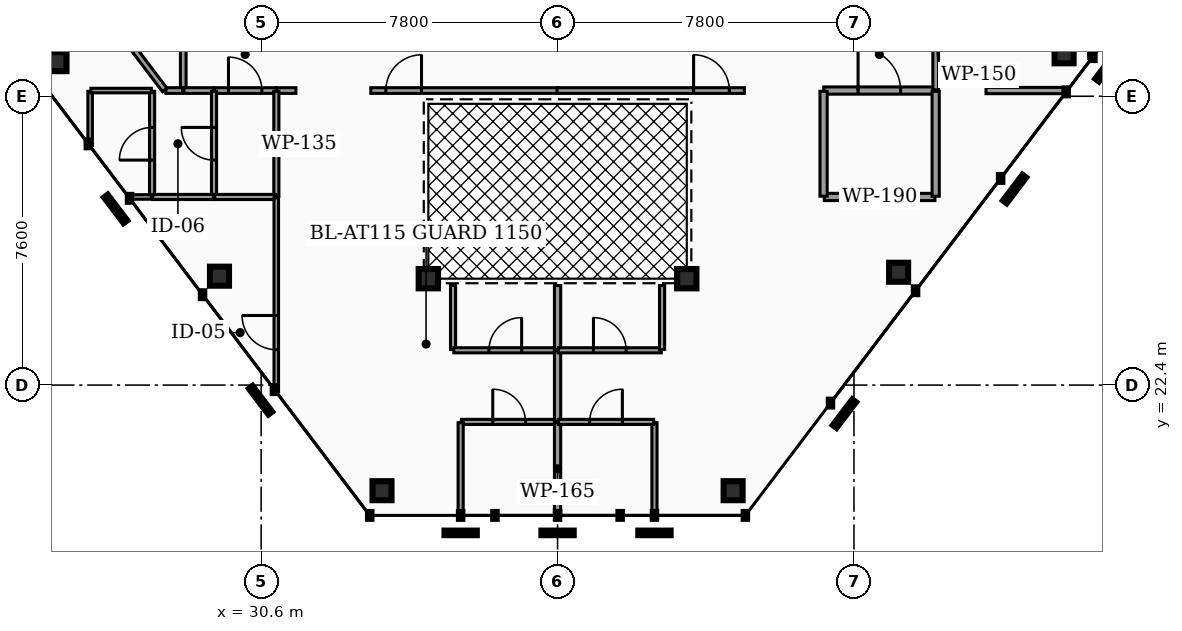
"""IFC4 building model, lengths in metres.
Left out: names, types, materials, properties, quantities, classifications, styles, units other than length and angle.
Written with IfcOpenShell. Run it as: python <this file> out.ifc"""

import sys

from ifc_helpers import new_model, si_unit, direction, frame, frame_2d, origin, origin_2d, place, context, subcontext, project, spatial, rectangle, hollow_rectangle, hollow_circle, extrude, element, fill, save


model = new_model("IFC4")
c1 = context("Model", 3, precision=1e-05, world=origin(), true_north=direction((0.0, 1.0)))
c2 = subcontext(c1, "Body", "Model", "MODEL_VIEW")
j1 = project(units=[si_unit("LENGTHUNIT", "METRE"), si_unit("PLANEANGLEUNIT", "RADIAN")], contexts=[c1])
p1 = place(None, origin())
s1 = spatial("IfcSite", under=j1, at=p1, CompositionType="ELEMENT")
p2 = place(p1, origin())
s2 = spatial("IfcBuilding", under=s1, at=p2, CompositionType="ELEMENT")
p3 = place(p2, frame((0.0, 0.0, 258.4)))
s3 = spatial("IfcBuildingStorey", under=s2, at=p3, CompositionType="ELEMENT", Elevation=258.4)
for number, where, z_axis, x_axis in (
    (1, (25.228, 30.91, 0.0), (0.0, 0.0, 1.0), (1.0, 0.0, 0.0)),
    (2, (29.504, 25.266, 0.0), (0.0, 0.0, 1.0), (1.0, 0.0, 0.0)),
    (3, (33.78, 19.621, 0.0), (0.0, 0.0, 1.0), (1.0, 0.0, 0.0)),
    (4, (43.02, 19.621, 0.0), (0.0, 0.0, 1.0), (1.0, 0.0, 0.0)),
    (5, (47.375, 25.369, 0.0), (0.0, 0.0, 1.0), (1.0, 0.0, 0.0)),
    (6, (51.729, 31.117, 0.0), (0.0, 0.0, 1.0), (1.0, 0.0, 0.0)),
):
    element("IfcColumn", number, at=place(p3, frame(where, z_axis=z_axis, x_axis=x_axis)), inside=s3, PredefinedType="COLUMN", context=c2, shape_type="SweptSolid", body=[
        extrude(hollow_rectangle(XDim=0.5, YDim=0.5, WallThickness=0.025, at=origin_2d()), origin(), (0.0, 0.0, 1.0), 3.18),
    ])
for number, where, z_axis, x_axis in (
    (7, (35.0, 25.2, 0.0), (0.0, 0.0, 1.0), (1.0, 0.0, 0.0)),
    (8, (41.8, 25.2, 0.0), (0.0, 0.0, 1.0), (1.0, 0.0, 0.0)),
):
    element("IfcColumn", number, at=place(p3, frame(where, z_axis=z_axis, x_axis=x_axis)), inside=s3, PredefinedType="COLUMN", context=c2, shape_type="SweptSolid", body=[
        extrude(hollow_circle(Radius=0.254, WallThickness=0.02, at=origin_2d()), origin(), (0.0, 0.0, 1.0), 3.18),
    ])
p4 = place(p3, frame((45.405, 30.15, 0.0), z_axis=(0.0, 0.0, 1.0), x_axis=(1.0, 0.0, 0.0)))
e9 = element("IfcWall", 9, at=p4, inside=s3, PredefinedType="PARTITIONING", context=c2, shape_type="SweptSolid", body=[
    extrude(rectangle(XDim=2.925, YDim=0.19, at=frame_2d((1.462, 0.0))), origin(), (0.0, 0.0, 1.0), 2.235),
])
p5 = place(p4, frame((0.903, 0.0, 0.0)))
e10 = element("IfcOpeningElement", 10, at=p5, cuts=e9, PredefinedType="OPENING", context=c2, shape_type="SweptSolid", body=[
    extrude(rectangle(XDim=1.12, YDim=2.05, at=frame_2d((0.56, 1.025))), frame((0.0, 0.105, 0.0), z_axis=(0.0, -1.0, 0.0), x_axis=(1.0, 0.0, 0.0)), (0.0, 0.0, 1.0), 0.21),
])
p6 = place(p3, frame((28.55, 30.17, 0.0), z_axis=(0.0, 0.0, 1.0), x_axis=(0.0, 1.0, 0.0)))
e11 = element("IfcWall", 11, at=p6, inside=s3, PredefinedType="PARTITIONING", context=c2, shape_type="SweptSolid", body=[
    extrude(rectangle(XDim=3.06, YDim=0.15, at=frame_2d((1.53, 0.0))), origin(), (0.0, 0.0, 1.0), 2.235),
])
p7 = place(p6, frame((1.06, 0.0, 0.0)))
e12 = element("IfcOpeningElement", 12, at=p7, cuts=e11, PredefinedType="OPENING", context=c2, shape_type="SweptSolid", body=[
    extrude(rectangle(XDim=0.94, YDim=2.05, at=frame_2d((0.47, 1.025))), frame((0.0, 0.085, 0.0), z_axis=(0.0, -1.0, 0.0), x_axis=(1.0, 0.0, 0.0)), (0.0, 0.0, 1.0), 0.17),
])
p8 = place(p3, frame((48.35, 30.17, 0.0), z_axis=(0.0, 0.0, 1.0), x_axis=(0.0, 1.0, 0.0)))
e13 = element("IfcWall", 13, at=p8, inside=s3, PredefinedType="PARTITIONING", context=c2, shape_type="SweptSolid", body=[
    extrude(rectangle(XDim=3.06, YDim=0.15, at=frame_2d((1.53, 0.0))), origin(), (0.0, 0.0, 1.0), 2.235),
])
p9 = place(p3, frame((28.57, 30.15, 0.0), z_axis=(0.0, 0.0, 1.0), x_axis=(1.0, 0.0, 0.0)))
e14 = element("IfcWall", 14, at=p9, inside=s3, PredefinedType="PARTITIONING", context=c2, shape_type="SweptSolid", body=[
    extrude(rectangle(XDim=0.785, YDim=0.15, at=frame_2d((0.393, 0.0))), origin(), (0.0, 0.0, 1.0), 2.235),
])
p10 = place(p3, frame((29.365, 30.15, 0.0), z_axis=(0.0, 0.0, 1.0), x_axis=(1.0, 0.0, 0.0)))
e15 = element("IfcWall", 15, at=p10, inside=s3, PredefinedType="PARTITIONING", context=c2, shape_type="SweptSolid", body=[
    extrude(rectangle(XDim=1.63, YDim=0.15, at=frame_2d((0.815, 0.0))), origin(), (0.0, 0.0, 1.0), 2.235),
])
p11 = place(p10, frame((0.375, 0.0, 0.0)))
e16 = element("IfcOpeningElement", 16, at=p11, cuts=e15, PredefinedType="OPENING", context=c2, shape_type="SweptSolid", body=[
    extrude(rectangle(XDim=0.88, YDim=2.05, at=frame_2d((0.44, 1.025))), frame((0.0, 0.085, 0.0), z_axis=(0.0, -1.0, 0.0), x_axis=(1.0, 0.0, 0.0)), (0.0, 0.0, 1.0), 0.17),
])
p12 = place(p3, frame((33.485, 30.15, 0.0), z_axis=(0.0, 0.0, 1.0), x_axis=(1.0, 0.0, 0.0)))
e17 = element("IfcWall", 17, at=p12, inside=s3, PredefinedType="PARTITIONING", context=c2, shape_type="SweptSolid", body=[
    extrude(rectangle(XDim=4.93, YDim=0.15, at=frame_2d((2.465, 0.0))), origin(), (0.0, 0.0, 1.0), 2.235),
])
p13 = place(p12, frame((0.395, 0.0, 0.0)))
e18 = element("IfcOpeningElement", 18, at=p13, cuts=e17, PredefinedType="OPENING", context=c2, shape_type="SweptSolid", body=[
    extrude(rectangle(XDim=0.94, YDim=2.05, at=frame_2d((0.47, 1.025))), frame((0.0, 0.085, 0.0), z_axis=(0.0, -1.0, 0.0), x_axis=(1.0, 0.0, 0.0)), (0.0, 0.0, 1.0), 0.17),
])
p14 = place(p3, frame((31.005, 30.15, 0.0), z_axis=(0.0, 0.0, 1.0), x_axis=(1.0, 0.0, 0.0)))
e19 = element("IfcWall", 19, at=p14, inside=s3, PredefinedType="PARTITIONING", context=c2, shape_type="SweptSolid", body=[
    extrude(rectangle(XDim=0.51, YDim=0.15, at=frame_2d((0.255, 0.0))), origin(), (0.0, 0.0, 1.0), 2.235),
])
p15 = place(p3, frame((38.385, 30.15, 0.0), z_axis=(0.0, 0.0, 1.0), x_axis=(1.0, 0.0, 0.0)))
e20 = element("IfcWall", 20, at=p15, inside=s3, PredefinedType="PARTITIONING", context=c2, shape_type="SweptSolid", body=[
    extrude(rectangle(XDim=4.93, YDim=0.15, at=frame_2d((2.465, 0.0))), origin(), (0.0, 0.0, 1.0), 2.235),
])
p16 = place(p15, frame((3.595, 0.0, 0.0)))
e21 = element("IfcOpeningElement", 21, at=p16, cuts=e20, PredefinedType="OPENING", context=c2, shape_type="SweptSolid", body=[
    extrude(rectangle(XDim=0.94, YDim=2.05, at=frame_2d((0.47, 1.025))), frame((0.0, 0.085, 0.0), z_axis=(0.0, -1.0, 0.0), x_axis=(1.0, 0.0, 0.0)), (0.0, 0.0, 1.0), 0.17),
])
p17 = place(p3, frame((45.42, 27.35, 0.0), z_axis=(0.0, 0.0, 1.0), x_axis=(1.0, 0.0, 0.0)))
e22 = element("IfcWall", 22, at=p17, inside=s3, PredefinedType="PARTITIONING", context=c2, shape_type="SweptSolid", body=[
    extrude(rectangle(XDim=2.91, YDim=0.19, at=frame_2d((1.455, 0.0))), origin(), (0.0, 0.0, 1.0), 2.235),
])
for number, where, z_axis, x_axis in (
    (23, (45.4, 27.37, 0.0), (0.0, 0.0, 1.0), (0.0, 1.0, 0.0)),
    (24, (48.35, 27.37, 0.0), (0.0, 0.0, 1.0), (0.0, 1.0, 0.0)),
):
    element("IfcWall", number, at=place(p3, frame(where, z_axis=z_axis, x_axis=x_axis)), inside=s3, PredefinedType="PARTITIONING", context=c2, shape_type="SweptSolid", body=[
        extrude(rectangle(XDim=2.76, YDim=0.19, at=frame_2d((1.38, 0.0))), origin(), (0.0, 0.0, 1.0), 2.235),
    ])
p18 = place(p3, frame((28.094, 30.15, 0.0), z_axis=(0.0, 0.0, 1.0), x_axis=(1.0, 0.0, 0.0)))
e25 = element("IfcWall", 25, at=p18, inside=s3, PredefinedType="PARTITIONING", context=c2, shape_type="SweptSolid", body=[
    extrude(rectangle(XDim=0.436, YDim=0.15, at=frame_2d((0.218, 0.0))), origin(), (0.0, 0.0, 1.0), 2.235),
])
p19 = place(p3, frame((26.562, 32.146, 0.0), z_axis=(0.0, 0.0, 1.0), x_axis=(0.603891739408, -0.797066350485, 0.0)))
e26 = element("IfcWall", 26, at=p19, inside=s3, PredefinedType="PARTITIONING", context=c2, shape_type="SweptSolid", body=[
    extrude(rectangle(XDim=2.485, YDim=0.15, at=frame_2d((1.242, 0.0))), origin(), (0.0, 0.0, 1.0), 2.235),
])
p20 = place(p3, frame((29.36, 27.37, 0.0), z_axis=(0.0, 0.0, 1.0), x_axis=(0.0, 1.0, 0.0)))
e27 = element("IfcWall", 27, at=p20, inside=s3, PredefinedType="PARTITIONING", context=c2, shape_type="SweptSolid", body=[
    extrude(rectangle(XDim=2.76, YDim=0.135, at=frame_2d((1.38, 0.0))), origin(), (0.0, 0.0, 1.0), 2.235),
])
p21 = place(p20, frame((0.95, 0.0, 0.0)))
e28 = element("IfcOpeningElement", 28, at=p21, cuts=e27, PredefinedType="OPENING", context=c2, shape_type="SweptSolid", body=[
    extrude(rectangle(XDim=0.86, YDim=2.05, at=frame_2d((0.43, 1.025))), frame((0.0, 0.077, 0.0), z_axis=(0.0, -1.0, 0.0), x_axis=(1.0, 0.0, 0.0)), (0.0, 0.0, 1.0), 0.155),
])
p22 = place(p3, frame((27.73, 27.37, 0.0), z_axis=(0.0, 0.0, 1.0), x_axis=(0.0, 1.0, 0.0)))
e29 = element("IfcWall", 29, at=p22, inside=s3, PredefinedType="PARTITIONING", context=c2, shape_type="SweptSolid", body=[
    extrude(rectangle(XDim=2.76, YDim=0.135, at=frame_2d((1.38, 0.0))), origin(), (0.0, 0.0, 1.0), 2.235),
])
p23 = place(p22, frame((0.95, 0.0, 0.0)))
e30 = element("IfcOpeningElement", 30, at=p23, cuts=e29, PredefinedType="OPENING", context=c2, shape_type="SweptSolid", body=[
    extrude(rectangle(XDim=0.86, YDim=2.05, at=frame_2d((0.43, 1.025))), frame((0.0, 0.077, 0.0), z_axis=(0.0, -1.0, 0.0), x_axis=(1.0, 0.0, 0.0)), (0.0, 0.0, 1.0), 0.155),
])
p24 = place(p3, frame((27.75, 27.35, 0.0), z_axis=(0.0, 0.0, 1.0), x_axis=(1.0, 0.0, 0.0)))
e31 = element("IfcWall", 31, at=p24, inside=s3, PredefinedType="PARTITIONING", context=c2, shape_type="SweptSolid", body=[
    extrude(rectangle(XDim=1.59, YDim=0.135, at=frame_2d((0.795, 0.0))), origin(), (0.0, 0.0, 1.0), 2.235),
])
p25 = place(p3, frame((31.0, 27.37, 0.0), z_axis=(0.0, 0.0, 1.0), x_axis=(0.0, 1.0, 0.0)))
e32 = element("IfcWall", 32, at=p25, inside=s3, PredefinedType="PARTITIONING", context=c2, shape_type="SweptSolid", body=[
    extrude(rectangle(XDim=2.76, YDim=0.135, at=frame_2d((1.38, 0.0))), origin(), (0.0, 0.0, 1.0), 2.235),
])
p26 = place(p3, frame((29.38, 27.35, 0.0), z_axis=(0.0, 0.0, 1.0), x_axis=(1.0, 0.0, 0.0)))
e33 = element("IfcWall", 33, at=p26, inside=s3, PredefinedType="PARTITIONING", context=c2, shape_type="SweptSolid", body=[
    extrude(rectangle(XDim=1.6, YDim=0.135, at=frame_2d((0.8, 0.0))), origin(), (0.0, 0.0, 1.0), 2.235),
])
p27 = place(p3, frame((27.125, 27.35, 0.0), z_axis=(0.0, 0.0, 1.0), x_axis=(1.0, 0.0, 0.0)))
e34 = element("IfcWall", 34, at=p27, inside=s3, PredefinedType="PARTITIONING", context=c2, shape_type="SweptSolid", body=[
    extrude(rectangle(XDim=0.585, YDim=0.12, at=frame_2d((0.293, 0.0))), origin(), (0.0, 0.0, 1.0), 2.235),
])
p28 = place(p3, frame((26.1, 28.698, 0.0), z_axis=(0.0, 0.0, 1.0), x_axis=(0.0, 1.0, 0.0)))
e35 = element("IfcWall", 35, at=p28, inside=s3, PredefinedType="PARTITIONING", context=c2, shape_type="SweptSolid", body=[
    extrude(rectangle(XDim=1.432, YDim=0.12, at=frame_2d((0.716, 0.0))), origin(), (0.0, 0.0, 1.0), 2.235),
])
p29 = place(p3, frame((26.12, 30.15, 0.0), z_axis=(0.0, 0.0, 1.0), x_axis=(1.0, 0.0, 0.0)))
e36 = element("IfcWall", 36, at=p29, inside=s3, PredefinedType="PARTITIONING", context=c2, shape_type="SweptSolid", body=[
    extrude(rectangle(XDim=1.59, YDim=0.12, at=frame_2d((0.795, 0.0))), origin(), (0.0, 0.0, 1.0), 2.235),
])
p30 = place(p3, frame((35.65, 23.336, 0.0), z_axis=(0.0, 0.0, 1.0), x_axis=(0.0, 1.0, 0.0)))
e37 = element("IfcWall", 37, at=p30, inside=s3, PredefinedType="PARTITIONING", context=c2, shape_type="SweptSolid", body=[
    extrude(rectangle(XDim=1.684, YDim=0.135, at=frame_2d((0.842, 0.0))), origin(), (0.0, 0.0, 1.0), 2.235),
])
p31 = place(p3, frame((35.67, 23.316, 0.0), z_axis=(0.0, 0.0, 1.0), x_axis=(1.0, 0.0, 0.0)))
e38 = element("IfcWall", 38, at=p31, inside=s3, PredefinedType="PARTITIONING", context=c2, shape_type="SweptSolid", body=[
    extrude(rectangle(XDim=2.71, YDim=0.135, at=frame_2d((1.355, 0.0))), origin(), (0.0, 0.0, 1.0), 2.235),
])
p32 = place(p31, frame((0.925, 0.0, 0.0)))
e39 = element("IfcOpeningElement", 39, at=p32, cuts=e38, PredefinedType="OPENING", context=c2, shape_type="SweptSolid", body=[
    extrude(rectangle(XDim=0.86, YDim=2.05, at=frame_2d((0.43, 1.025))), frame((0.0, 0.077, 0.0), z_axis=(0.0, -1.0, 0.0), x_axis=(1.0, 0.0, 0.0)), (0.0, 0.0, 1.0), 0.155),
])
p33 = place(p3, frame((35.87, 21.431, 0.0), z_axis=(0.0, 0.0, 1.0), x_axis=(1.0, 0.0, 0.0)))
e40 = element("IfcWall", 40, at=p33, inside=s3, PredefinedType="PARTITIONING", context=c2, shape_type="SweptSolid", body=[
    extrude(rectangle(XDim=2.51, YDim=0.135, at=frame_2d((1.255, 0.0))), origin(), (0.0, 0.0, 1.0), 2.235),
])
p34 = place(p33, frame((0.825, 0.0, 0.0)))
e41 = element("IfcOpeningElement", 41, at=p34, cuts=e40, PredefinedType="OPENING", context=c2, shape_type="SweptSolid", body=[
    extrude(rectangle(XDim=0.86, YDim=2.05, at=frame_2d((0.43, 1.025))), frame((0.0, 0.077, 0.0), z_axis=(0.0, -1.0, 0.0), x_axis=(1.0, 0.0, 0.0)), (0.0, 0.0, 1.0), 0.155),
])
p35 = place(p3, frame((35.85, 18.986, 0.0), z_axis=(0.0, 0.0, 1.0), x_axis=(0.0, 1.0, 0.0)))
e42 = element("IfcWall", 42, at=p35, inside=s3, PredefinedType="PARTITIONING", context=c2, shape_type="SweptSolid", body=[
    extrude(rectangle(XDim=2.425, YDim=0.135, at=frame_2d((1.212, 0.0))), origin(), (0.0, 0.0, 1.0), 2.235),
])
p36 = place(p3, frame((30.998, 22.232, 0.0), z_axis=(0.0, 0.0, 1.0), x_axis=(0.0, 1.0, 0.0)))
e43 = element("IfcWall", 43, at=p36, inside=s3, PredefinedType="PARTITIONING", context=c2, shape_type="SweptSolid", body=[
    extrude(rectangle(XDim=5.098, YDim=0.12, at=frame_2d((2.549, 0.0))), origin(), (0.0, 0.0, 1.0), 2.235),
])
p37 = place(p36, frame((1.099, 0.0, 0.0)))
e44 = element("IfcOpeningElement", 44, at=p37, cuts=e43, PredefinedType="OPENING", context=c2, shape_type="SweptSolid", body=[
    extrude(rectangle(XDim=0.9, YDim=2.05, at=frame_2d((0.45, 1.025))), frame((0.0, 0.07, 0.0), z_axis=(0.0, -1.0, 0.0), x_axis=(1.0, 0.0, 0.0)), (0.0, 0.0, 1.0), 0.14),
])
p38 = place(p3, frame((38.4, 21.451, 0.0), z_axis=(0.0, 0.0, 1.0), x_axis=(0.0, 1.0, 0.0)))
e45 = element("IfcWall", 45, at=p38, inside=s3, PredefinedType="PARTITIONING", context=c2, shape_type="SweptSolid", body=[
    extrude(rectangle(XDim=1.844, YDim=0.165, at=frame_2d((0.922, 0.0))), origin(), (0.0, 0.0, 1.0), 2.235),
])
p39 = place(p3, frame((38.4, 23.336, 0.0), z_axis=(0.0, 0.0, 1.0), x_axis=(0.0, 1.0, 0.0)))
e46 = element("IfcWall", 46, at=p39, inside=s3, PredefinedType="PARTITIONING", context=c2, shape_type="SweptSolid", body=[
    extrude(rectangle(XDim=1.684, YDim=0.165, at=frame_2d((0.842, 0.0))), origin(), (0.0, 0.0, 1.0), 2.235),
])
p40 = place(p3, frame((38.4, 18.986, 0.0), z_axis=(0.0, 0.0, 1.0), x_axis=(0.0, 1.0, 0.0)))
e47 = element("IfcWall", 47, at=p40, inside=s3, PredefinedType="PARTITIONING", context=c2, shape_type="SweptSolid", body=[
    extrude(rectangle(XDim=2.425, YDim=0.165, at=frame_2d((1.212, 0.0))), origin(), (0.0, 0.0, 1.0), 2.235),
])
p41 = place(p3, frame((38.42, 23.316, 0.0), z_axis=(0.0, 0.0, 1.0), x_axis=(1.0, 0.0, 0.0)))
e48 = element("IfcWall", 48, at=p41, inside=s3, PredefinedType="PARTITIONING", context=c2, shape_type="SweptSolid", body=[
    extrude(rectangle(XDim=2.71, YDim=0.135, at=frame_2d((1.355, 0.0))), origin(), (0.0, 0.0, 1.0), 2.235),
])
p42 = place(p41, frame((0.925, 0.0, 0.0)))
e49 = element("IfcOpeningElement", 49, at=p42, cuts=e48, PredefinedType="OPENING", context=c2, shape_type="SweptSolid", body=[
    extrude(rectangle(XDim=0.86, YDim=2.05, at=frame_2d((0.43, 1.025))), frame((0.0, 0.077, 0.0), z_axis=(0.0, -1.0, 0.0), x_axis=(1.0, 0.0, 0.0)), (0.0, 0.0, 1.0), 0.155),
])
p43 = place(p3, frame((41.15, 23.336, 0.0), z_axis=(0.0, 0.0, 1.0), x_axis=(0.0, 1.0, 0.0)))
e50 = element("IfcWall", 50, at=p43, inside=s3, PredefinedType="PARTITIONING", context=c2, shape_type="SweptSolid", body=[
    extrude(rectangle(XDim=1.684, YDim=0.135, at=frame_2d((0.842, 0.0))), origin(), (0.0, 0.0, 1.0), 2.235),
])
p44 = place(p3, frame((40.95, 18.986, 0.0), z_axis=(0.0, 0.0, 1.0), x_axis=(0.0, 1.0, 0.0)))
e51 = element("IfcWall", 51, at=p44, inside=s3, PredefinedType="PARTITIONING", context=c2, shape_type="SweptSolid", body=[
    extrude(rectangle(XDim=2.425, YDim=0.135, at=frame_2d((1.212, 0.0))), origin(), (0.0, 0.0, 1.0), 2.235),
])
p45 = place(p3, frame((38.42, 21.431, 0.0), z_axis=(0.0, 0.0, 1.0), x_axis=(1.0, 0.0, 0.0)))
e52 = element("IfcWall", 52, at=p45, inside=s3, PredefinedType="PARTITIONING", context=c2, shape_type="SweptSolid", body=[
    extrude(rectangle(XDim=2.51, YDim=0.135, at=frame_2d((1.255, 0.0))), origin(), (0.0, 0.0, 1.0), 2.235),
])
p46 = place(p45, frame((0.825, 0.0, 0.0)))
e53 = element("IfcOpeningElement", 53, at=p46, cuts=e52, PredefinedType="OPENING", context=c2, shape_type="SweptSolid", body=[
    extrude(rectangle(XDim=0.86, YDim=2.05, at=frame_2d((0.43, 1.025))), frame((0.0, 0.077, 0.0), z_axis=(0.0, -1.0, 0.0), x_axis=(1.0, 0.0, 0.0)), (0.0, 0.0, 1.0), 0.155),
])
p47 = place(p3, frame((49.674, 30.15, 0.0), z_axis=(0.0, 0.0, 1.0), x_axis=(1.0, 0.0, 0.0)))
e54 = element("IfcWall", 54, at=p47, inside=s3, PredefinedType="PARTITIONING", context=c2, shape_type="SweptSolid", body=[
    extrude(rectangle(XDim=2.122, YDim=0.165, at=frame_2d((1.061, 0.0))), origin(), (0.0, 0.0, 1.0), 2.235),
])
p48 = place(p3, frame((52.439, 30.994, 0.0), z_axis=(0.0, 0.0, 1.0), x_axis=(0.0, 1.0, 0.0)))
e55 = element("IfcWall", 55, at=p48, inside=s3, PredefinedType="PARTITIONING", context=c2, shape_type="SweptSolid", body=[
    extrude(rectangle(XDim=1.686, YDim=0.135, at=frame_2d((0.843, 0.0))), origin(), (0.0, 0.0, 1.0), 2.235),
])
p49 = place(p5, origin())
e56 = element("IfcDoor", 56, at=p49, inside=s3, OperationType="SINGLE_SWING_LEFT", PredefinedType="DOOR", context=c2, shape_type="SweptSolid", body=[
    extrude(rectangle(XDim=1.12, YDim=2.05, at=frame_2d((0.56, 1.025))), frame((0.0, 0.025, 0.0), z_axis=(0.0, -1.0, 0.0), x_axis=(1.0, 0.0, 0.0)), (0.0, 0.0, 1.0), 0.05),
])
fill(e10, e56)
p50 = place(p11, origin())
e57 = element("IfcDoor", 57, at=p50, inside=s3, OperationType="SINGLE_SWING_LEFT", PredefinedType="DOOR", context=c2, shape_type="SweptSolid", body=[
    extrude(rectangle(XDim=0.88, YDim=2.05, at=frame_2d((0.44, 1.025))), frame((0.0, 0.025, 0.0), z_axis=(0.0, -1.0, 0.0), x_axis=(1.0, 0.0, 0.0)), (0.0, 0.0, 1.0), 0.05),
])
fill(e16, e57)
p51 = place(p13, origin())
e58 = element("IfcDoor", 58, at=p51, inside=s3, OperationType="SINGLE_SWING_RIGHT", PredefinedType="DOOR", context=c2, shape_type="SweptSolid", body=[
    extrude(rectangle(XDim=0.94, YDim=2.05, at=frame_2d((0.47, 1.025))), frame((0.0, 0.025, 0.0), z_axis=(0.0, -1.0, 0.0), x_axis=(1.0, 0.0, 0.0)), (0.0, 0.0, 1.0), 0.05),
])
fill(e18, e58)
p52 = place(p16, origin())
e59 = element("IfcDoor", 59, at=p52, inside=s3, OperationType="SINGLE_SWING_LEFT", PredefinedType="DOOR", context=c2, shape_type="SweptSolid", body=[
    extrude(rectangle(XDim=0.94, YDim=2.05, at=frame_2d((0.47, 1.025))), frame((0.0, 0.025, 0.0), z_axis=(0.0, -1.0, 0.0), x_axis=(1.0, 0.0, 0.0)), (0.0, 0.0, 1.0), 0.05),
])
fill(e21, e59)
p53 = place(p21, origin())
e60 = element("IfcDoor", 60, at=p53, inside=s3, OperationType="SINGLE_SWING_RIGHT", PredefinedType="DOOR", context=c2, shape_type="SweptSolid", body=[
    extrude(rectangle(XDim=0.86, YDim=2.05, at=frame_2d((0.43, 1.025))), frame((0.0, 0.025, 0.0), z_axis=(0.0, -1.0, 0.0), x_axis=(1.0, 0.0, 0.0)), (0.0, 0.0, 1.0), 0.05),
])
fill(e28, e60)
p54 = place(p23, origin())
e61 = element("IfcDoor", 61, at=p54, inside=s3, OperationType="SINGLE_SWING_LEFT", PredefinedType="DOOR", context=c2, shape_type="SweptSolid", body=[
    extrude(rectangle(XDim=0.86, YDim=2.05, at=frame_2d((0.43, 1.025))), frame((0.0, 0.025, 0.0), z_axis=(0.0, -1.0, 0.0), x_axis=(1.0, 0.0, 0.0)), (0.0, 0.0, 1.0), 0.05),
])
fill(e30, e61)
p55 = place(p32, origin())
e62 = element("IfcDoor", 62, at=p55, inside=s3, OperationType="SINGLE_SWING_RIGHT", PredefinedType="DOOR", context=c2, shape_type="SweptSolid", body=[
    extrude(rectangle(XDim=0.86, YDim=2.05, at=frame_2d((0.43, 1.025))), frame((0.0, 0.025, 0.0), z_axis=(0.0, -1.0, 0.0), x_axis=(1.0, 0.0, 0.0)), (0.0, 0.0, 1.0), 0.05),
])
fill(e39, e62)
p56 = place(p34, origin())
e63 = element("IfcDoor", 63, at=p56, inside=s3, OperationType="SINGLE_SWING_LEFT", PredefinedType="DOOR", context=c2, shape_type="SweptSolid", body=[
    extrude(rectangle(XDim=0.86, YDim=2.05, at=frame_2d((0.43, 1.025))), frame((0.0, 0.025, 0.0), z_axis=(0.0, -1.0, 0.0), x_axis=(1.0, 0.0, 0.0)), (0.0, 0.0, 1.0), 0.05),
])
fill(e41, e63)
p57 = place(p37, origin())
e64 = element("IfcDoor", 64, at=p57, inside=s3, OperationType="SINGLE_SWING_RIGHT", PredefinedType="DOOR", context=c2, shape_type="SweptSolid", body=[
    extrude(rectangle(XDim=0.9, YDim=2.05, at=frame_2d((0.45, 1.025))), frame((0.0, 0.025, 0.0), z_axis=(0.0, -1.0, 0.0), x_axis=(1.0, 0.0, 0.0)), (0.0, 0.0, 1.0), 0.05),
])
fill(e44, e64)
p58 = place(p42, origin())
e65 = element("IfcDoor", 65, at=p58, inside=s3, OperationType="SINGLE_SWING_LEFT", PredefinedType="DOOR", context=c2, shape_type="SweptSolid", body=[
    extrude(rectangle(XDim=0.86, YDim=2.05, at=frame_2d((0.43, 1.025))), frame((0.0, 0.025, 0.0), z_axis=(0.0, -1.0, 0.0), x_axis=(1.0, 0.0, 0.0)), (0.0, 0.0, 1.0), 0.05),
])
fill(e49, e65)
p59 = place(p46, origin())
e66 = element("IfcDoor", 66, at=p59, inside=s3, OperationType="SINGLE_SWING_RIGHT", PredefinedType="DOOR", context=c2, shape_type="SweptSolid", body=[
    extrude(rectangle(XDim=0.86, YDim=2.05, at=frame_2d((0.43, 1.025))), frame((0.0, 0.025, 0.0), z_axis=(0.0, -1.0, 0.0), x_axis=(1.0, 0.0, 0.0)), (0.0, 0.0, 1.0), 0.05),
])
fill(e53, e66)
save(model, sys.argv[1])
